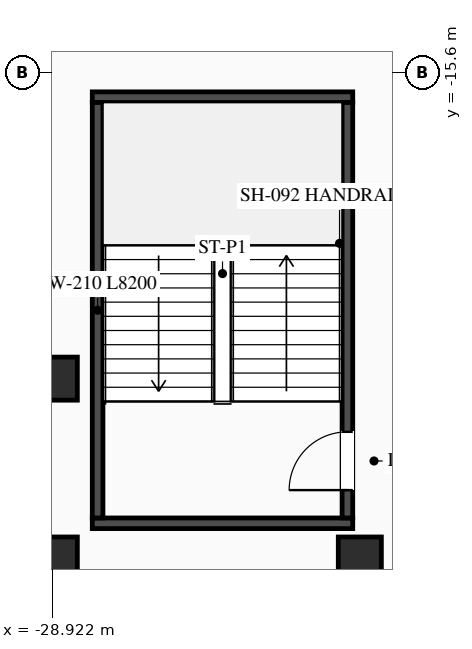
"""IFC4 building model, lengths in metres.
Left out: names, types, materials, properties, quantities, classifications, styles, units other than length and angle.
Written with IfcOpenShell. Run it as: python <this file> out.ifc"""

import sys

from ifc_helpers import new_model, si_unit, direction, frame, frame_2d, origin, origin_2d, place, context, subcontext, project, spatial, rectangle, i_section, extrude, element, fill, save


model = new_model("IFC4")
c1 = context("Model", 3, precision=1e-05, world=origin(), true_north=direction((0.0, 1.0)))
c2 = subcontext(c1, "Body", "Model", "MODEL_VIEW")
j1 = project(units=[si_unit("LENGTHUNIT", "METRE"), si_unit("PLANEANGLEUNIT", "RADIAN")], contexts=[c1])
p1 = place(None, origin())
s1 = spatial("IfcSite", under=j1, at=p1, CompositionType="ELEMENT")
p2 = place(p1, origin())
s2 = spatial("IfcBuilding", under=s1, at=p2, CompositionType="ELEMENT")
p3 = place(p2, frame((0.0, 0.0, 18.6)))
s3 = spatial("IfcBuildingStorey", under=s2, at=p3, CompositionType="ELEMENT", Elevation=18.6)
for number, where, z_axis, x_axis in (
    (1, (-28.13, -24.505, 0.0), (0.0, 0.0, 1.0), (1.0, 0.0, 0.0)),
    (2, (-28.13, -16.095, 0.0), (0.0, 0.0, 1.0), (1.0, 0.0, 0.0)),
):
    element("IfcWall", number, at=place(p3, frame(where, z_axis=z_axis, x_axis=x_axis)), inside=s3, PredefinedType="SHEAR", context=c2, shape_type="SweptSolid", body=[
        extrude(rectangle(XDim=5.14, YDim=0.21, at=frame_2d((2.57, 0.0))), origin(), (0.0, 0.0, 1.0), 3.95),
    ])
p4 = place(p3, frame((-28.025, -24.4, 0.0), z_axis=(0.0, 0.0, 1.0), x_axis=(0.0, 1.0, 0.0)))
e3 = element("IfcWall", 3, at=p4, inside=s3, PredefinedType="SHEAR", context=c2, shape_type="SweptSolid", body=[
    extrude(rectangle(XDim=8.2, YDim=0.21, at=frame_2d((4.1, 0.0))), origin(), (0.0, 0.0, 1.0), 3.95),
])
p5 = place(p3, frame((-23.095, -24.4, 0.0), z_axis=(0.0, 0.0, 1.0), x_axis=(0.0, 1.0, 0.0)))
e4 = element("IfcWall", 4, at=p5, inside=s3, PredefinedType="SHEAR", context=c2, shape_type="SweptSolid", body=[
    extrude(rectangle(XDim=8.2, YDim=0.21, at=frame_2d((4.1, 0.0))), origin(), (0.0, 0.0, 1.0), 3.95),
])
p6 = place(p5, frame((0.55, 0.0, 0.0)))
e5 = element("IfcOpeningElement", 5, at=p6, cuts=e4, PredefinedType="OPENING", context=c2, shape_type="SweptSolid", body=[
    extrude(rectangle(XDim=1.15, YDim=2.1, at=frame_2d((0.575, 1.05))), frame((0.0, 0.115, 0.0), z_axis=(0.0, -1.0, 0.0), x_axis=(1.0, 0.0, 0.0)), (0.0, 0.0, 1.0), 0.23),
])
for number, where, z_axis, x_axis in (
    (6, (-28.85, -21.65, 0.0), (0.0, 0.0, 1.0), (1.0, 0.0, 0.0)),
    (7, (-28.85, -25.2, 0.0), (0.0, 0.0, 1.0), (1.0, 0.0, 0.0)),
    (8, (-22.85, -25.2, 0.0), (0.0, 0.0, 1.0), (1.0, 0.0, 0.0)),
):
    element("IfcColumn", number, at=place(p3, frame(where, z_axis=z_axis, x_axis=x_axis)), inside=s3, PredefinedType="COLUMN", context=c2, shape_type="SweptSolid", body=[
        extrude(i_section(OverallWidth=0.85, OverallDepth=0.85, WebThickness=0.032, FlangeThickness=0.048, at=origin_2d()), origin(), (0.0, 0.0, 1.0), 4.2),
    ])
p7 = place(p6, origin())
e9 = element("IfcDoor", 9, at=p7, inside=s3, OperationType="SINGLE_SWING_LEFT", PredefinedType="DOOR", context=c2, shape_type="SweptSolid", body=[
    extrude(rectangle(XDim=1.15, YDim=2.1, at=frame_2d((0.575, 1.05))), frame((0.0, 0.025, 0.0), z_axis=(0.0, -1.0, 0.0), x_axis=(1.0, 0.0, 0.0)), (0.0, 0.0, 1.0), 0.05),
])
fill(e5, e9)
save(model, sys.argv[1])
